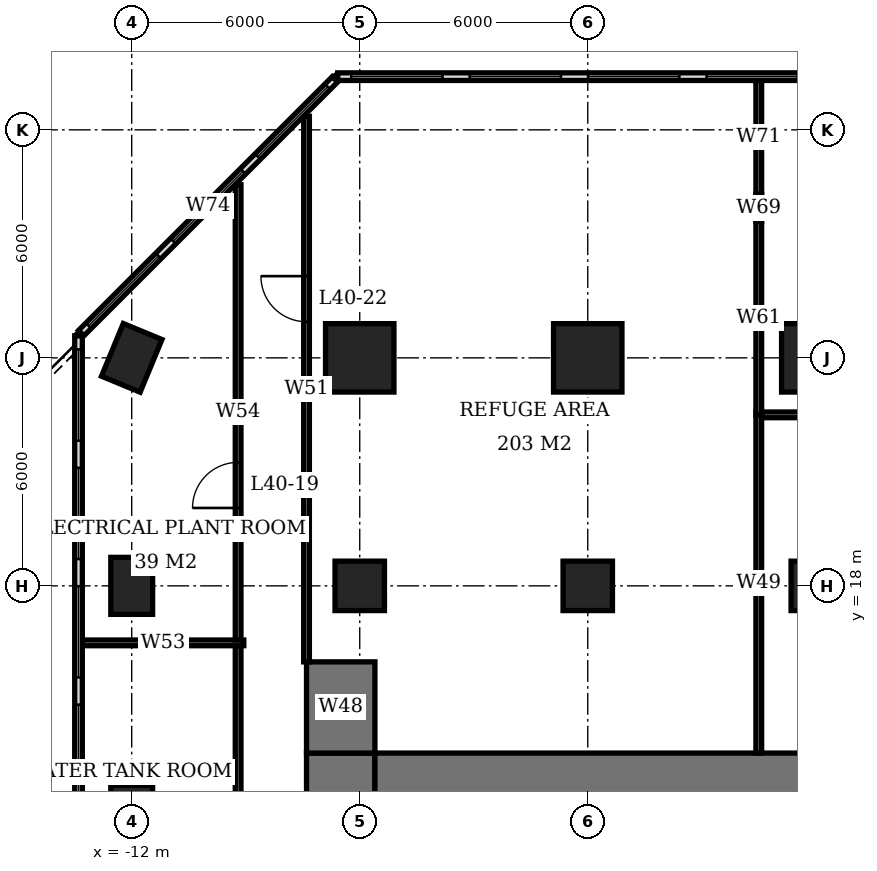
"""IFC4 building model, lengths in metres.
Left out: names, types, materials, properties, quantities, classifications, styles, units other than length and angle.
Written with IfcOpenShell. Run it as: python <this file> out.ifc"""

import sys

from ifc_helpers import new_model, si_unit, direction, frame, frame_2d, origin, origin_2d, place, context, subcontext, project, spatial, rectangle, extrude, element, fill, save


model = new_model("IFC4")
c1 = context("Model", 3, precision=1e-05, world=origin(), true_north=direction((0.0, 1.0)))
c2 = subcontext(c1, "Body", "Model", "MODEL_VIEW")
j1 = project(units=[si_unit("LENGTHUNIT", "METRE"), si_unit("PLANEANGLEUNIT", "RADIAN")], contexts=[c1])
p1 = place(None, origin())
s1 = spatial("IfcSite", under=j1, at=p1, CompositionType="ELEMENT")
p2 = place(p1, origin())
s2 = spatial("IfcBuilding", under=s1, at=p2, CompositionType="ELEMENT")
p3 = place(p2, frame((0.0, 0.0, 164.0)))
s3 = spatial("IfcBuildingStorey", under=s2, at=p3, CompositionType="ELEMENT", Elevation=164.0)
for number, where, z_axis, x_axis in (
    (1, (-12.0, 12.0, 0.0), (0.0, 0.0, 1.0), (0.0, 1.0, 0.0)),
    (2, (-12.0, 18.0, 0.0), (0.0, 0.0, 1.0), (0.0, 1.0, 0.0)),
    (3, (-12.0, 24.0, 0.0), (0.0, 0.0, 1.0), (0.383, 0.924, 0.0)),
):
    element("IfcColumn", number, at=place(p3, frame(where, z_axis=z_axis, x_axis=x_axis)), inside=s3, PredefinedType="COLUMN", context=c2, shape_type="SweptSolid", body=[
        extrude(rectangle(XDim=1.5, YDim=1.1, at=origin_2d()), origin(), (0.0, 0.0, 1.0), 5.4),
    ])
p4 = place(p3, frame((-6.0, 18.0, 0.0), z_axis=(0.0, 0.0, 1.0), x_axis=(1.0, 0.0, 0.0)))
e4 = element("IfcColumn", 4, at=p4, inside=s3, PredefinedType="COLUMN", context=c2, shape_type="SweptSolid", body=[
    extrude(rectangle(XDim=1.3, YDim=1.3, at=origin_2d()), origin(), (0.0, 0.0, 1.0), 5.4),
])
p5 = place(p3, frame((-6.0, 24.0, 0.0), z_axis=(0.0, 0.0, 1.0), x_axis=(1.0, 0.0, 0.0)))
e5 = element("IfcColumn", 5, at=p5, inside=s3, PredefinedType="COLUMN", context=c2, shape_type="SweptSolid", body=[
    extrude(rectangle(XDim=1.8, YDim=1.8, at=origin_2d()), origin(), (0.0, 0.0, 1.0), 5.4),
])
p6 = place(p3, frame((0.0, 18.0, 0.0), z_axis=(0.0, 0.0, 1.0), x_axis=(1.0, 0.0, 0.0)))
e6 = element("IfcColumn", 6, at=p6, inside=s3, PredefinedType="COLUMN", context=c2, shape_type="SweptSolid", body=[
    extrude(rectangle(XDim=1.3, YDim=1.3, at=origin_2d()), origin(), (0.0, 0.0, 1.0), 5.4),
])
p7 = place(p3, frame((0.0, 24.0, 0.0), z_axis=(0.0, 0.0, 1.0), x_axis=(1.0, 0.0, 0.0)))
e7 = element("IfcColumn", 7, at=p7, inside=s3, PredefinedType="COLUMN", context=c2, shape_type="SweptSolid", body=[
    extrude(rectangle(XDim=1.8, YDim=1.8, at=origin_2d()), origin(), (0.0, 0.0, 1.0), 5.4),
])
p8 = place(p3, frame((6.0, 18.0, 0.0), z_axis=(0.0, 0.0, 1.0), x_axis=(1.0, 0.0, 0.0)))
e8 = element("IfcColumn", 8, at=p8, inside=s3, PredefinedType="COLUMN", context=c2, shape_type="SweptSolid", body=[
    extrude(rectangle(XDim=1.3, YDim=1.3, at=origin_2d()), origin(), (0.0, 0.0, 1.0), 5.4),
])
p9 = place(p3, frame((6.0, 24.0, 0.0), z_axis=(0.0, 0.0, 1.0), x_axis=(1.0, 0.0, 0.0)))
e9 = element("IfcColumn", 9, at=p9, inside=s3, PredefinedType="COLUMN", context=c2, shape_type="SweptSolid", body=[
    extrude(rectangle(XDim=1.8, YDim=1.8, at=origin_2d()), origin(), (0.0, 0.0, 1.0), 5.4),
])
p10 = place(p3, frame((-5.6, 12.6, 0.0), z_axis=(0.0, 0.0, 1.0), x_axis=(1.0, 0.0, 0.0)))
e10 = element("IfcWall", 10, at=p10, inside=s3, PredefinedType="SHEAR", context=c2, shape_type="SweptSolid", body=[
    extrude(rectangle(XDim=23.2, YDim=2.0, at=frame_2d((11.6, 0.0))), origin(), (0.0, 0.0, 1.0), 5.4),
])
p11 = place(p3, frame((-6.5, -7.6, 0.0), z_axis=(0.0, 0.0, 1.0), x_axis=(0.0, 1.0, 0.0)))
e11 = element("IfcWall", 11, at=p11, inside=s3, PredefinedType="SHEAR", context=c2, shape_type="SweptSolid", body=[
    extrude(rectangle(XDim=21.2, YDim=1.8, at=frame_2d((10.6, 0.0))), origin(), (0.0, 0.0, 1.0), 5.4),
])
p12 = place(p11, frame((7.8, 0.0, 0.0)))
e12 = element("IfcOpeningElement", 12, at=p12, cuts=e11, PredefinedType="OPENING", context=c2, shape_type="SweptSolid", body=[
    extrude(rectangle(XDim=1.8, YDim=2.4, at=frame_2d((0.9, 1.2))), frame((0.0, 0.91, 0.0), z_axis=(0.0, -1.0, 0.0), x_axis=(1.0, 0.0, 0.0)), (0.0, 0.0, 1.0), 1.82),
])
p13 = place(p3, frame((-6.5, 13.6, 0.0), z_axis=(0.0, 0.0, 1.0), x_axis=(0.0, 1.0, 0.0)))
e13 = element("IfcWall", 13, at=p13, inside=s3, PredefinedType="SHEAR", context=c2, shape_type="SweptSolid", body=[
    extrude(rectangle(XDim=2.4, YDim=1.8, at=frame_2d((1.2, 0.0))), origin(), (0.0, 0.0, 1.0), 5.4),
])
p14 = place(p3, frame((24.58, 31.4, 0.0), z_axis=(0.0, 0.0, 1.0), x_axis=(-1.0, 0.0, 0.0)))
e14 = element("IfcWall", 14, at=p14, inside=s3, PredefinedType="USERDEFINED", context=c2, shape_type="SweptSolid", body=[
    extrude(rectangle(XDim=31.16, YDim=0.2, at=frame_2d((15.58, 0.0))), origin(), (0.0, 0.0, 1.0), 5.4),
])
p15 = place(p14, frame((0.358, 0.0, 0.6)))
e15 = element("IfcOpeningElement", 15, at=p15, cuts=e14, PredefinedType="OPENING", context=c2, shape_type="SweptSolid", body=[
    extrude(rectangle(XDim=2.4, YDim=3.0, at=frame_2d((1.2, 1.5))), frame((0.0, 0.11, 0.0), z_axis=(0.0, -1.0, 0.0), x_axis=(1.0, 0.0, 0.0)), (0.0, 0.0, 1.0), 0.22),
])
p16 = place(p14, frame((3.474, 0.0, 0.6)))
e16 = element("IfcOpeningElement", 16, at=p16, cuts=e14, PredefinedType="OPENING", context=c2, shape_type="SweptSolid", body=[
    extrude(rectangle(XDim=2.4, YDim=3.0, at=frame_2d((1.2, 1.5))), frame((0.0, 0.11, 0.0), z_axis=(0.0, -1.0, 0.0), x_axis=(1.0, 0.0, 0.0)), (0.0, 0.0, 1.0), 0.22),
])
p17 = place(p14, frame((6.59, 0.0, 0.6)))
e17 = element("IfcOpeningElement", 17, at=p17, cuts=e14, PredefinedType="OPENING", context=c2, shape_type="SweptSolid", body=[
    extrude(rectangle(XDim=2.4, YDim=3.0, at=frame_2d((1.2, 1.5))), frame((0.0, 0.11, 0.0), z_axis=(0.0, -1.0, 0.0), x_axis=(1.0, 0.0, 0.0)), (0.0, 0.0, 1.0), 0.22),
])
p18 = place(p14, frame((9.706, 0.0, 0.6)))
e18 = element("IfcOpeningElement", 18, at=p18, cuts=e14, PredefinedType="OPENING", context=c2, shape_type="SweptSolid", body=[
    extrude(rectangle(XDim=2.4, YDim=3.0, at=frame_2d((1.2, 1.5))), frame((0.0, 0.11, 0.0), z_axis=(0.0, -1.0, 0.0), x_axis=(1.0, 0.0, 0.0)), (0.0, 0.0, 1.0), 0.22),
])
p19 = place(p14, frame((12.822, 0.0, 0.6)))
e19 = element("IfcOpeningElement", 19, at=p19, cuts=e14, PredefinedType="OPENING", context=c2, shape_type="SweptSolid", body=[
    extrude(rectangle(XDim=2.4, YDim=3.0, at=frame_2d((1.2, 1.5))), frame((0.0, 0.11, 0.0), z_axis=(0.0, -1.0, 0.0), x_axis=(1.0, 0.0, 0.0)), (0.0, 0.0, 1.0), 0.22),
])
p20 = place(p14, frame((15.938, 0.0, 0.6)))
e20 = element("IfcOpeningElement", 20, at=p20, cuts=e14, PredefinedType="OPENING", context=c2, shape_type="SweptSolid", body=[
    extrude(rectangle(XDim=2.4, YDim=3.0, at=frame_2d((1.2, 1.5))), frame((0.0, 0.11, 0.0), z_axis=(0.0, -1.0, 0.0), x_axis=(1.0, 0.0, 0.0)), (0.0, 0.0, 1.0), 0.22),
])
p21 = place(p14, frame((19.054, 0.0, 0.6)))
e21 = element("IfcOpeningElement", 21, at=p21, cuts=e14, PredefinedType="OPENING", context=c2, shape_type="SweptSolid", body=[
    extrude(rectangle(XDim=2.4, YDim=3.0, at=frame_2d((1.2, 1.5))), frame((0.0, 0.11, 0.0), z_axis=(0.0, -1.0, 0.0), x_axis=(1.0, 0.0, 0.0)), (0.0, 0.0, 1.0), 0.22),
])
p22 = place(p14, frame((22.17, 0.0, 0.6)))
e22 = element("IfcOpeningElement", 22, at=p22, cuts=e14, PredefinedType="OPENING", context=c2, shape_type="SweptSolid", body=[
    extrude(rectangle(XDim=2.4, YDim=3.0, at=frame_2d((1.2, 1.5))), frame((0.0, 0.11, 0.0), z_axis=(0.0, -1.0, 0.0), x_axis=(1.0, 0.0, 0.0)), (0.0, 0.0, 1.0), 0.22),
])
p23 = place(p14, frame((25.286, 0.0, 0.6)))
e23 = element("IfcOpeningElement", 23, at=p23, cuts=e14, PredefinedType="OPENING", context=c2, shape_type="SweptSolid", body=[
    extrude(rectangle(XDim=2.4, YDim=3.0, at=frame_2d((1.2, 1.5))), frame((0.0, 0.11, 0.0), z_axis=(0.0, -1.0, 0.0), x_axis=(1.0, 0.0, 0.0)), (0.0, 0.0, 1.0), 0.22),
])
p24 = place(p14, frame((28.402, 0.0, 0.6)))
e24 = element("IfcOpeningElement", 24, at=p24, cuts=e14, PredefinedType="OPENING", context=c2, shape_type="SweptSolid", body=[
    extrude(rectangle(XDim=2.4, YDim=3.0, at=frame_2d((1.2, 1.5))), frame((0.0, 0.11, 0.0), z_axis=(0.0, -1.0, 0.0), x_axis=(1.0, 0.0, 0.0)), (0.0, 0.0, 1.0), 0.22),
])
p25 = place(p3, frame((-6.651, 31.329, 0.0), z_axis=(0.0, 0.0, 1.0), x_axis=(-0.707106781187, -0.707106781187, 0.0)))
e25 = element("IfcWall", 25, at=p25, inside=s3, PredefinedType="USERDEFINED", context=c2, shape_type="SweptSolid", body=[
    extrude(rectangle(XDim=9.445, YDim=0.2, at=frame_2d((4.723, 0.0))), origin(), (0.0, 0.0, 1.0), 5.4),
])
p26 = place(p25, frame((0.274, 0.0, 0.6)))
e26 = element("IfcOpeningElement", 26, at=p26, cuts=e25, PredefinedType="OPENING", context=c2, shape_type="SweptSolid", body=[
    extrude(rectangle(XDim=2.6, YDim=3.0, at=frame_2d((1.3, 1.5))), frame((0.0, 0.11, 0.0), z_axis=(0.0, -1.0, 0.0), x_axis=(1.0, 0.0, 0.0)), (0.0, 0.0, 1.0), 0.22),
])
p27 = place(p25, frame((3.423, 0.0, 0.6)))
e27 = element("IfcOpeningElement", 27, at=p27, cuts=e25, PredefinedType="OPENING", context=c2, shape_type="SweptSolid", body=[
    extrude(rectangle(XDim=2.6, YDim=3.0, at=frame_2d((1.3, 1.5))), frame((0.0, 0.11, 0.0), z_axis=(0.0, -1.0, 0.0), x_axis=(1.0, 0.0, 0.0)), (0.0, 0.0, 1.0), 0.22),
])
p28 = place(p25, frame((6.571, 0.0, 0.6)))
e28 = element("IfcOpeningElement", 28, at=p28, cuts=e25, PredefinedType="OPENING", context=c2, shape_type="SweptSolid", body=[
    extrude(rectangle(XDim=2.6, YDim=3.0, at=frame_2d((1.3, 1.5))), frame((0.0, 0.11, 0.0), z_axis=(0.0, -1.0, 0.0), x_axis=(1.0, 0.0, 0.0)), (0.0, 0.0, 1.0), 0.22),
])
p29 = place(p3, frame((-13.4, 24.58, 0.0), z_axis=(0.0, 0.0, 1.0), x_axis=(0.0, -1.0, 0.0)))
e29 = element("IfcWall", 29, at=p29, inside=s3, PredefinedType="USERDEFINED", context=c2, shape_type="SweptSolid", body=[
    extrude(rectangle(XDim=31.16, YDim=0.2, at=frame_2d((15.58, 0.0))), origin(), (0.0, 0.0, 1.0), 5.4),
])
p30 = place(p29, frame((0.358, 0.0, 0.6)))
e30 = element("IfcOpeningElement", 30, at=p30, cuts=e29, PredefinedType="OPENING", context=c2, shape_type="SweptSolid", body=[
    extrude(rectangle(XDim=2.4, YDim=3.0, at=frame_2d((1.2, 1.5))), frame((0.0, 0.11, 0.0), z_axis=(0.0, -1.0, 0.0), x_axis=(1.0, 0.0, 0.0)), (0.0, 0.0, 1.0), 0.22),
])
p31 = place(p29, frame((3.474, 0.0, 0.6)))
e31 = element("IfcOpeningElement", 31, at=p31, cuts=e29, PredefinedType="OPENING", context=c2, shape_type="SweptSolid", body=[
    extrude(rectangle(XDim=2.4, YDim=3.0, at=frame_2d((1.2, 1.5))), frame((0.0, 0.11, 0.0), z_axis=(0.0, -1.0, 0.0), x_axis=(1.0, 0.0, 0.0)), (0.0, 0.0, 1.0), 0.22),
])
p32 = place(p29, frame((6.59, 0.0, 0.6)))
e32 = element("IfcOpeningElement", 32, at=p32, cuts=e29, PredefinedType="OPENING", context=c2, shape_type="SweptSolid", body=[
    extrude(rectangle(XDim=2.4, YDim=3.0, at=frame_2d((1.2, 1.5))), frame((0.0, 0.11, 0.0), z_axis=(0.0, -1.0, 0.0), x_axis=(1.0, 0.0, 0.0)), (0.0, 0.0, 1.0), 0.22),
])
p33 = place(p29, frame((9.706, 0.0, 0.6)))
e33 = element("IfcOpeningElement", 33, at=p33, cuts=e29, PredefinedType="OPENING", context=c2, shape_type="SweptSolid", body=[
    extrude(rectangle(XDim=2.4, YDim=3.0, at=frame_2d((1.2, 1.5))), frame((0.0, 0.11, 0.0), z_axis=(0.0, -1.0, 0.0), x_axis=(1.0, 0.0, 0.0)), (0.0, 0.0, 1.0), 0.22),
])
p34 = place(p29, frame((12.822, 0.0, 0.6)))
e34 = element("IfcOpeningElement", 34, at=p34, cuts=e29, PredefinedType="OPENING", context=c2, shape_type="SweptSolid", body=[
    extrude(rectangle(XDim=2.4, YDim=3.0, at=frame_2d((1.2, 1.5))), frame((0.0, 0.11, 0.0), z_axis=(0.0, -1.0, 0.0), x_axis=(1.0, 0.0, 0.0)), (0.0, 0.0, 1.0), 0.22),
])
p35 = place(p29, frame((15.938, 0.0, 0.6)))
e35 = element("IfcOpeningElement", 35, at=p35, cuts=e29, PredefinedType="OPENING", context=c2, shape_type="SweptSolid", body=[
    extrude(rectangle(XDim=2.4, YDim=3.0, at=frame_2d((1.2, 1.5))), frame((0.0, 0.11, 0.0), z_axis=(0.0, -1.0, 0.0), x_axis=(1.0, 0.0, 0.0)), (0.0, 0.0, 1.0), 0.22),
])
p36 = place(p29, frame((19.054, 0.0, 0.6)))
e36 = element("IfcOpeningElement", 36, at=p36, cuts=e29, PredefinedType="OPENING", context=c2, shape_type="SweptSolid", body=[
    extrude(rectangle(XDim=2.4, YDim=3.0, at=frame_2d((1.2, 1.5))), frame((0.0, 0.11, 0.0), z_axis=(0.0, -1.0, 0.0), x_axis=(1.0, 0.0, 0.0)), (0.0, 0.0, 1.0), 0.22),
])
p37 = place(p29, frame((22.17, 0.0, 0.6)))
e37 = element("IfcOpeningElement", 37, at=p37, cuts=e29, PredefinedType="OPENING", context=c2, shape_type="SweptSolid", body=[
    extrude(rectangle(XDim=2.4, YDim=3.0, at=frame_2d((1.2, 1.5))), frame((0.0, 0.11, 0.0), z_axis=(0.0, -1.0, 0.0), x_axis=(1.0, 0.0, 0.0)), (0.0, 0.0, 1.0), 0.22),
])
p38 = place(p29, frame((25.286, 0.0, 0.6)))
e38 = element("IfcOpeningElement", 38, at=p38, cuts=e29, PredefinedType="OPENING", context=c2, shape_type="SweptSolid", body=[
    extrude(rectangle(XDim=2.4, YDim=3.0, at=frame_2d((1.2, 1.5))), frame((0.0, 0.11, 0.0), z_axis=(0.0, -1.0, 0.0), x_axis=(1.0, 0.0, 0.0)), (0.0, 0.0, 1.0), 0.22),
])
p39 = place(p29, frame((28.402, 0.0, 0.6)))
e39 = element("IfcOpeningElement", 39, at=p39, cuts=e29, PredefinedType="OPENING", context=c2, shape_type="SweptSolid", body=[
    extrude(rectangle(XDim=2.4, YDim=3.0, at=frame_2d((1.2, 1.5))), frame((0.0, 0.11, 0.0), z_axis=(0.0, -1.0, 0.0), x_axis=(1.0, 0.0, 0.0)), (0.0, 0.0, 1.0), 0.22),
])
p40 = place(p3, frame((-13.3, 16.5, 0.0), z_axis=(0.0, 0.0, 1.0), x_axis=(1.0, 0.0, 0.0)))
e40 = element("IfcWall", 40, at=p40, inside=s3, PredefinedType="PARTITIONING", context=c2, shape_type="SweptSolid", body=[
    extrude(rectangle(XDim=4.25, YDim=0.15, at=frame_2d((2.125, 0.0))), origin(), (0.0, 0.0, 1.0), 5.15),
])
p41 = place(p3, frame((-9.2, 7.575, 0.0), z_axis=(0.0, 0.0, 1.0), x_axis=(0.0, 1.0, 0.0)))
e41 = element("IfcWall", 41, at=p41, inside=s3, PredefinedType="PARTITIONING", context=c2, shape_type="SweptSolid", body=[
    extrude(rectangle(XDim=8.85, YDim=0.15, at=frame_2d((4.425, 0.0))), origin(), (0.0, 0.0, 1.0), 5.15),
])
p42 = place(p41, frame((2.475, 0.0, 0.0)))
e42 = element("IfcOpeningElement", 42, at=p42, cuts=e41, PredefinedType="OPENING", context=c2, shape_type="SweptSolid", body=[
    extrude(rectangle(XDim=1.2, YDim=2.4, at=frame_2d((0.6, 1.2))), frame((0.0, 0.085, 0.0), z_axis=(0.0, -1.0, 0.0), x_axis=(1.0, 0.0, 0.0)), (0.0, 0.0, 1.0), 0.17),
])
p43 = place(p3, frame((-9.2, 16.575, 0.0), z_axis=(0.0, 0.0, 1.0), x_axis=(0.0, 1.0, 0.0)))
e43 = element("IfcWall", 43, at=p43, inside=s3, PredefinedType="PARTITIONING", context=c2, shape_type="SweptSolid", body=[
    extrude(rectangle(XDim=11.981, YDim=0.15, at=frame_2d((5.99, 0.0))), origin(), (0.0, 0.0, 1.0), 5.15),
])
p44 = place(p43, frame((3.475, 0.0, 0.0)))
e44 = element("IfcOpeningElement", 44, at=p44, cuts=e43, PredefinedType="OPENING", context=c2, shape_type="SweptSolid", body=[
    extrude(rectangle(XDim=1.2, YDim=2.4, at=frame_2d((0.6, 1.2))), frame((0.0, 0.085, 0.0), z_axis=(0.0, -1.0, 0.0), x_axis=(1.0, 0.0, 0.0)), (0.0, 0.0, 1.0), 0.17),
])
p45 = place(p3, frame((-7.4, 16.0, 0.0), z_axis=(0.0, 0.0, 1.0), x_axis=(0.0, 1.0, 0.0)))
e45 = element("IfcWall", 45, at=p45, inside=s3, PredefinedType="PARTITIONING", context=c2, shape_type="SweptSolid", body=[
    extrude(rectangle(XDim=14.356, YDim=0.15, at=frame_2d((7.178, 0.0))), origin(), (0.0, 0.0, 1.0), 5.15),
])
p46 = place(p45, frame((8.95, 0.0, 0.0)))
e46 = element("IfcOpeningElement", 46, at=p46, cuts=e45, PredefinedType="OPENING", context=c2, shape_type="SweptSolid", body=[
    extrude(rectangle(XDim=1.2, YDim=2.4, at=frame_2d((0.6, 1.2))), frame((0.0, 0.085, 0.0), z_axis=(0.0, -1.0, 0.0), x_axis=(1.0, 0.0, 0.0)), (0.0, 0.0, 1.0), 0.17),
])
p47 = place(p3, frame((4.5, 13.6, 0.0), z_axis=(0.0, 0.0, 1.0), x_axis=(0.0, 1.0, 0.0)))
e47 = element("IfcWall", 47, at=p47, inside=s3, PredefinedType="PARTITIONING", context=c2, shape_type="SweptSolid", body=[
    extrude(rectangle(XDim=8.975, YDim=0.15, at=frame_2d((4.487, 0.0))), origin(), (0.0, 0.0, 1.0), 5.15),
])
p48 = place(p3, frame((4.5, 22.5, 0.0), z_axis=(0.0, 0.0, 1.0), x_axis=(0.0, 1.0, 0.0)))
e48 = element("IfcWall", 48, at=p48, inside=s3, PredefinedType="PARTITIONING", context=c2, shape_type="SweptSolid", body=[
    extrude(rectangle(XDim=5.09, YDim=0.15, at=frame_2d((2.545, 0.0))), origin(), (0.0, 0.0, 1.0), 5.15),
])
p49 = place(p3, frame((4.5, 27.59, 0.0), z_axis=(0.0, 0.0, 1.0), x_axis=(0.0, 1.0, 0.0)))
e49 = element("IfcWall", 49, at=p49, inside=s3, PredefinedType="PARTITIONING", context=c2, shape_type="SweptSolid", body=[
    extrude(rectangle(XDim=0.72, YDim=0.15, at=frame_2d((0.36, 0.0))), origin(), (0.0, 0.0, 1.0), 4.15),
])
p50 = place(p3, frame((4.5, 28.31, 0.0), z_axis=(0.0, 0.0, 1.0), x_axis=(0.0, 1.0, 0.0)))
e50 = element("IfcWall", 50, at=p50, inside=s3, PredefinedType="PARTITIONING", context=c2, shape_type="SweptSolid", body=[
    extrude(rectangle(XDim=2.99, YDim=0.15, at=frame_2d((1.495, 0.0))), origin(), (0.0, 0.0, 1.0), 5.15),
])
p51 = place(p3, frame((4.575, 22.5, 0.0), z_axis=(0.0, 0.0, 1.0), x_axis=(1.0, 0.0, 0.0)))
e51 = element("IfcWall", 51, at=p51, inside=s3, PredefinedType="PARTITIONING", context=c2, shape_type="SweptSolid", body=[
    extrude(rectangle(XDim=14.975, YDim=0.15, at=frame_2d((7.488, 0.0))), origin(), (0.0, 0.0, 1.0), 5.15),
])
p52 = place(p21, origin())
e52 = element("IfcWindow", 52, at=p52, inside=s3, PartitioningType="SINGLE_PANEL", PredefinedType="USERDEFINED", context=c2, shape_type="SweptSolid", body=[
    extrude(rectangle(XDim=2.4, YDim=3.0, at=frame_2d((1.2, 1.5))), frame((0.0, 0.03, 0.0), z_axis=(0.0, -1.0, 0.0), x_axis=(1.0, 0.0, 0.0)), (0.0, 0.0, 1.0), 0.06),
])
fill(e21, e52)
p53 = place(p22, origin())
e53 = element("IfcWindow", 53, at=p53, inside=s3, PartitioningType="SINGLE_PANEL", PredefinedType="USERDEFINED", context=c2, shape_type="SweptSolid", body=[
    extrude(rectangle(XDim=2.4, YDim=3.0, at=frame_2d((1.2, 1.5))), frame((0.0, 0.03, 0.0), z_axis=(0.0, -1.0, 0.0), x_axis=(1.0, 0.0, 0.0)), (0.0, 0.0, 1.0), 0.06),
])
fill(e22, e53)
p54 = place(p23, origin())
e54 = element("IfcWindow", 54, at=p54, inside=s3, PartitioningType="SINGLE_PANEL", PredefinedType="USERDEFINED", context=c2, shape_type="SweptSolid", body=[
    extrude(rectangle(XDim=2.4, YDim=3.0, at=frame_2d((1.2, 1.5))), frame((0.0, 0.03, 0.0), z_axis=(0.0, -1.0, 0.0), x_axis=(1.0, 0.0, 0.0)), (0.0, 0.0, 1.0), 0.06),
])
fill(e23, e54)
p55 = place(p24, origin())
e55 = element("IfcWindow", 55, at=p55, inside=s3, PartitioningType="SINGLE_PANEL", PredefinedType="USERDEFINED", context=c2, shape_type="SweptSolid", body=[
    extrude(rectangle(XDim=2.4, YDim=3.0, at=frame_2d((1.2, 1.5))), frame((0.0, 0.03, 0.0), z_axis=(0.0, -1.0, 0.0), x_axis=(1.0, 0.0, 0.0)), (0.0, 0.0, 1.0), 0.06),
])
fill(e24, e55)
p56 = place(p26, origin())
e56 = element("IfcWindow", 56, at=p56, inside=s3, PartitioningType="SINGLE_PANEL", PredefinedType="USERDEFINED", context=c2, shape_type="SweptSolid", body=[
    extrude(rectangle(XDim=2.6, YDim=3.0, at=frame_2d((1.3, 1.5))), frame((0.0, 0.03, 0.0), z_axis=(0.0, -1.0, 0.0), x_axis=(1.0, 0.0, 0.0)), (0.0, 0.0, 1.0), 0.06),
])
fill(e26, e56)
p57 = place(p27, origin())
e57 = element("IfcWindow", 57, at=p57, inside=s3, PartitioningType="SINGLE_PANEL", PredefinedType="USERDEFINED", context=c2, shape_type="SweptSolid", body=[
    extrude(rectangle(XDim=2.6, YDim=3.0, at=frame_2d((1.3, 1.5))), frame((0.0, 0.03, 0.0), z_axis=(0.0, -1.0, 0.0), x_axis=(1.0, 0.0, 0.0)), (0.0, 0.0, 1.0), 0.06),
])
fill(e27, e57)
p58 = place(p28, origin())
e58 = element("IfcWindow", 58, at=p58, inside=s3, PartitioningType="SINGLE_PANEL", PredefinedType="USERDEFINED", context=c2, shape_type="SweptSolid", body=[
    extrude(rectangle(XDim=2.6, YDim=3.0, at=frame_2d((1.3, 1.5))), frame((0.0, 0.03, 0.0), z_axis=(0.0, -1.0, 0.0), x_axis=(1.0, 0.0, 0.0)), (0.0, 0.0, 1.0), 0.06),
])
fill(e28, e58)
p59 = place(p30, origin())
e59 = element("IfcWindow", 59, at=p59, inside=s3, PartitioningType="SINGLE_PANEL", PredefinedType="USERDEFINED", context=c2, shape_type="SweptSolid", body=[
    extrude(rectangle(XDim=2.4, YDim=3.0, at=frame_2d((1.2, 1.5))), frame((0.0, 0.03, 0.0), z_axis=(0.0, -1.0, 0.0), x_axis=(1.0, 0.0, 0.0)), (0.0, 0.0, 1.0), 0.06),
])
fill(e30, e59)
p60 = place(p31, origin())
e60 = element("IfcWindow", 60, at=p60, inside=s3, PartitioningType="SINGLE_PANEL", PredefinedType="USERDEFINED", context=c2, shape_type="SweptSolid", body=[
    extrude(rectangle(XDim=2.4, YDim=3.0, at=frame_2d((1.2, 1.5))), frame((0.0, 0.03, 0.0), z_axis=(0.0, -1.0, 0.0), x_axis=(1.0, 0.0, 0.0)), (0.0, 0.0, 1.0), 0.06),
])
fill(e31, e60)
p61 = place(p32, origin())
e61 = element("IfcWindow", 61, at=p61, inside=s3, PartitioningType="SINGLE_PANEL", PredefinedType="USERDEFINED", context=c2, shape_type="SweptSolid", body=[
    extrude(rectangle(XDim=2.4, YDim=3.0, at=frame_2d((1.2, 1.5))), frame((0.0, 0.03, 0.0), z_axis=(0.0, -1.0, 0.0), x_axis=(1.0, 0.0, 0.0)), (0.0, 0.0, 1.0), 0.06),
])
fill(e32, e61)
p62 = place(p33, origin())
e62 = element("IfcWindow", 62, at=p62, inside=s3, PartitioningType="SINGLE_PANEL", PredefinedType="USERDEFINED", context=c2, shape_type="SweptSolid", body=[
    extrude(rectangle(XDim=2.4, YDim=3.0, at=frame_2d((1.2, 1.5))), frame((0.0, 0.03, 0.0), z_axis=(0.0, -1.0, 0.0), x_axis=(1.0, 0.0, 0.0)), (0.0, 0.0, 1.0), 0.06),
])
fill(e33, e62)
p63 = place(p44, origin())
e63 = element("IfcDoor", 63, at=p63, inside=s3, OperationType="SINGLE_SWING_LEFT", PredefinedType="DOOR", context=c2, shape_type="SweptSolid", body=[
    extrude(rectangle(XDim=1.2, YDim=2.4, at=frame_2d((0.6, 1.2))), frame((0.0, 0.025, 0.0), z_axis=(0.0, -1.0, 0.0), x_axis=(1.0, 0.0, 0.0)), (0.0, 0.0, 1.0), 0.05),
])
fill(e44, e63)
p64 = place(p46, origin())
e64 = element("IfcDoor", 64, at=p64, inside=s3, OperationType="SINGLE_SWING_RIGHT", PredefinedType="DOOR", context=c2, shape_type="SweptSolid", body=[
    extrude(rectangle(XDim=1.2, YDim=2.4, at=frame_2d((0.6, 1.2))), frame((0.0, 0.025, 0.0), z_axis=(0.0, -1.0, 0.0), x_axis=(1.0, 0.0, 0.0)), (0.0, 0.0, 1.0), 0.05),
])
fill(e46, e64)
save(model, sys.argv[1])
